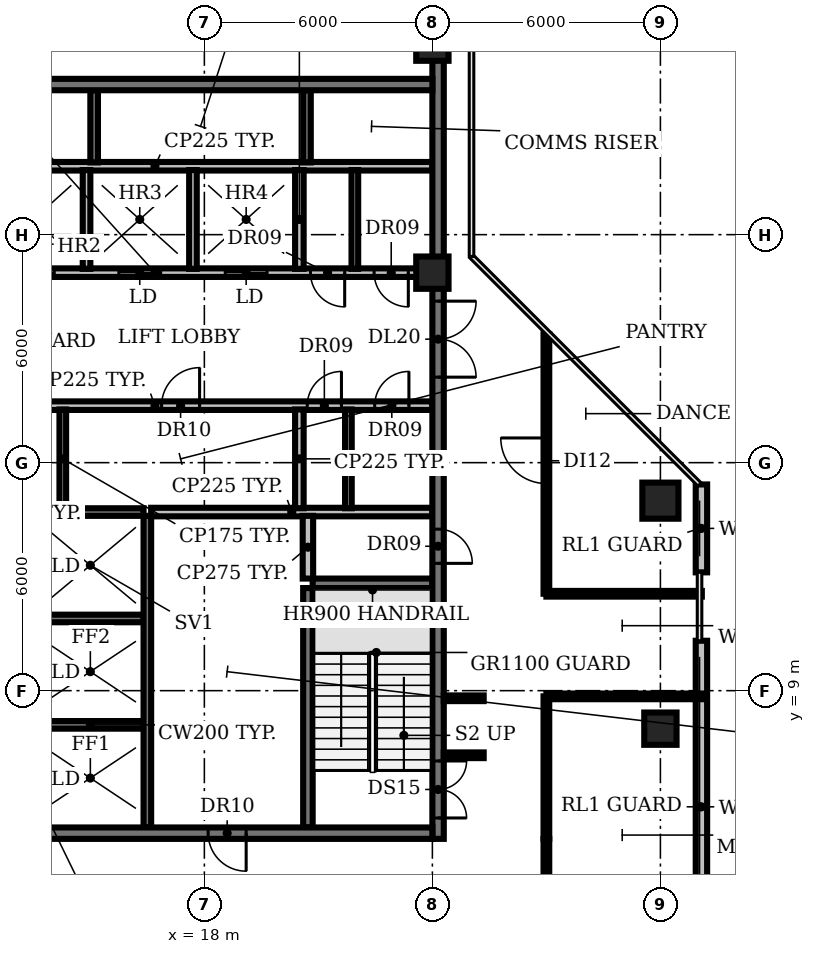
"""IFC4 building model, lengths in metres.
Left out: names, types, materials, properties, quantities, classifications, styles, units other than length and angle.
Written with IfcOpenShell. Run it as: python <this file> out.ifc"""

import sys

from ifc_helpers import new_model, si_unit, direction, frame, frame_2d, origin, origin_2d, place, context, subcontext, project, spatial, rectangle, circle, extrude, element, fill, save


model = new_model("IFC4")
c1 = context("Model", 3, precision=1e-05, world=origin(), true_north=direction((0.0, 1.0)))
c2 = subcontext(c1, "Body", "Model", "MODEL_VIEW")
j1 = project(units=[si_unit("LENGTHUNIT", "METRE"), si_unit("PLANEANGLEUNIT", "RADIAN")], contexts=[c1])
p1 = place(None, origin())
s1 = spatial("IfcSite", under=j1, at=p1, CompositionType="ELEMENT")
p2 = place(p1, origin())
s2 = spatial("IfcBuilding", under=s1, at=p2, CompositionType="ELEMENT")
p3 = place(p2, frame((0.0, 0.0, 264.2)))
s3 = spatial("IfcBuildingStorey", under=s2, at=p3, CompositionType="ELEMENT", Elevation=264.2)
p4 = place(p3, frame((24.0, 20.0, 0.0), z_axis=(0.0, 0.0, 1.0), x_axis=(1.0, 0.0, 0.0)))
e1 = element("IfcColumn", 1, at=p4, inside=s3, PredefinedType="COLUMN", context=c2, shape_type="SweptSolid", body=[
    extrude(circle(Radius=0.425, at=origin_2d()), origin(), (0.0, 0.0, 1.0), 3.85),
])
for number, where, z_axis, x_axis in (
    (2, (24.0, 26.0, -0.35), (0.0, 0.0, 1.0), (1.0, 0.0, 0.0)),
    (3, (30.0, 8.0, -0.35), (0.0, 0.0, 1.0), (1.0, 0.0, 0.0)),
):
    element("IfcColumn", number, at=place(p3, frame(where, z_axis=z_axis, x_axis=x_axis)), inside=s3, PredefinedType="COLUMN", context=c2, shape_type="SweptSolid", body=[
        extrude(rectangle(XDim=0.85, YDim=0.85, at=origin_2d()), origin(), (0.0, 0.0, 1.0), 4.2),
    ])
p5 = place(p3, frame((30.0, 14.0, -0.35), z_axis=(0.0, 0.0, 1.0), x_axis=(1.0, 0.0, 0.0)))
e4 = element("IfcColumn", 4, at=p5, inside=s3, PredefinedType="COLUMN", context=c2, shape_type="SweptSolid", body=[
    extrude(circle(Radius=0.475, at=origin_2d()), origin(), (0.0, 0.0, 1.0), 4.2),
])
p6 = place(p3, frame((31.08, 1.573, 0.0), z_axis=(0.0, 0.0, 1.0), x_axis=(0.0, 1.0, 0.0)))
e5 = element("IfcWall", 5, at=p6, inside=s3, PredefinedType="SOLIDWALL", context=c2, shape_type="SweptSolid", body=[
    extrude(rectangle(XDim=8.74, YDim=0.3, at=frame_2d((4.37, 0.0))), origin(), (0.0, 0.0, 1.0), 3.85),
])
p7 = place(p3, frame((31.08, 12.113, 0.0), z_axis=(0.0, 0.0, 1.0), x_axis=(0.0, 1.0, 0.0)))
e6 = element("IfcWall", 6, at=p7, inside=s3, PredefinedType="SOLIDWALL", context=c2, shape_type="SweptSolid", body=[
    extrude(rectangle(XDim=2.313, YDim=0.3, at=frame_2d((1.157, 0.0))), origin(), (0.0, 0.0, 1.0), 3.85),
])
for number, where, z_axis, x_axis in (
    (7, (13.6, 8.1, 0.0), (0.0, 0.0, 1.0), (1.0, 0.0, 0.0)),
    (8, (13.6, 10.9, 0.0), (0.0, 0.0, 1.0), (1.0, 0.0, 0.0)),
):
    element("IfcWall", number, at=place(p3, frame(where, z_axis=z_axis, x_axis=x_axis)), inside=s3, PredefinedType="SHEAR", context=c2, shape_type="SweptSolid", body=[
        extrude(rectangle(XDim=2.8, YDim=0.2, at=frame_2d((1.4, 0.0))), origin(), (0.0, 0.0, 1.0), 3.85),
    ])
p8 = place(p3, frame((20.85, 11.825, 0.0), z_axis=(0.0, 0.0, 1.0), x_axis=(1.0, 0.0, 0.0)))
e9 = element("IfcWall", 9, at=p8, inside=s3, PredefinedType="SHEAR", context=c2, shape_type="SweptSolid", body=[
    extrude(rectangle(XDim=3.15, YDim=0.25, at=frame_2d((1.575, 0.0))), origin(), (0.0, 0.0, 1.0), 3.85),
])
p9 = place(p3, frame((13.6, 13.7, 0.0), z_axis=(0.0, 0.0, 1.0), x_axis=(1.0, 0.0, 0.0)))
e10 = element("IfcWall", 10, at=p9, inside=s3, PredefinedType="SHEAR", context=c2, shape_type="SweptSolid", body=[
    extrude(rectangle(XDim=2.8, YDim=0.2, at=frame_2d((1.4, 0.0))), origin(), (0.0, 0.0, 1.0), 3.85),
])
p10 = place(p3, frame((16.6, 13.7, 0.0), z_axis=(0.0, 0.0, 1.0), x_axis=(1.0, 0.0, 0.0)))
e11 = element("IfcWall", 11, at=p10, inside=s3, PredefinedType="PARTITIONING", context=c2, shape_type="SweptSolid", body=[
    extrude(rectangle(XDim=7.4, YDim=0.225, at=frame_2d((3.7, 0.0))), origin(), (0.0, 0.0, 1.0), 3.85),
])
p11 = place(p3, frame((9.4, 16.5, 0.0), z_axis=(0.0, 0.0, 1.0), x_axis=(1.0, 0.0, 0.0)))
e12 = element("IfcWall", 12, at=p11, inside=s3, PredefinedType="PARTITIONING", context=c2, shape_type="SweptSolid", body=[
    extrude(rectangle(XDim=14.6, YDim=0.225, at=frame_2d((7.3, 0.0))), origin(), (0.0, 0.0, 1.0), 3.85),
])
p12 = place(p11, frame((1.9, 0.0, 0.0)))
e13 = element("IfcOpeningElement", 13, at=p12, cuts=e12, PredefinedType="OPENING", context=c2, shape_type="SweptSolid", body=[
    extrude(rectangle(XDim=1.0, YDim=2.1, at=frame_2d((0.5, 1.05))), frame((0.0, 0.123, 0.0), z_axis=(0.0, -1.0, 0.0), x_axis=(1.0, 0.0, 0.0)), (0.0, 0.0, 1.0), 0.245),
])
p13 = place(p11, frame((7.475, 0.0, 0.0)))
e14 = element("IfcOpeningElement", 14, at=p13, cuts=e12, PredefinedType="OPENING", context=c2, shape_type="SweptSolid", body=[
    extrude(rectangle(XDim=1.0, YDim=2.1, at=frame_2d((0.5, 1.05))), frame((0.0, 0.123, 0.0), z_axis=(0.0, -1.0, 0.0), x_axis=(1.0, 0.0, 0.0)), (0.0, 0.0, 1.0), 0.245),
])
p14 = place(p11, frame((11.308, 0.0, 0.0)))
e15 = element("IfcOpeningElement", 15, at=p14, cuts=e12, PredefinedType="OPENING", context=c2, shape_type="SweptSolid", body=[
    extrude(rectangle(XDim=0.9, YDim=2.1, at=frame_2d((0.45, 1.05))), frame((0.0, 0.123, 0.0), z_axis=(0.0, -1.0, 0.0), x_axis=(1.0, 0.0, 0.0)), (0.0, 0.0, 1.0), 0.245),
])
p15 = place(p11, frame((13.083, 0.0, 0.0)))
e16 = element("IfcOpeningElement", 16, at=p15, cuts=e12, PredefinedType="OPENING", context=c2, shape_type="SweptSolid", body=[
    extrude(rectangle(XDim=0.9, YDim=2.1, at=frame_2d((0.45, 1.05))), frame((0.0, 0.123, 0.0), z_axis=(0.0, -1.0, 0.0), x_axis=(1.0, 0.0, 0.0)), (0.0, 0.0, 1.0), 0.245),
])
p16 = place(p3, frame((24.0, 20.0, 0.0), z_axis=(0.0, 0.0, 1.0), x_axis=(-1.0, 0.0, 0.0)))
e17 = element("IfcWall", 17, at=p16, inside=s3, PredefinedType="PARTITIONING", context=c2, shape_type="SweptSolid", body=[
    extrude(rectangle(XDim=14.6, YDim=0.225, at=frame_2d((7.3, 0.0))), origin(), (0.0, 0.0, 1.0), 3.85),
])
p17 = place(p16, frame((12.75, 0.0, 0.0)))
e18 = element("IfcOpeningElement", 18, at=p17, cuts=e17, PredefinedType="OPENING", context=c2, shape_type="SweptSolid", body=[
    extrude(rectangle(XDim=1.1, YDim=2.1, at=frame_2d((0.55, 1.05))), frame((0.0, 0.123, 0.0), z_axis=(0.0, -1.0, 0.0), x_axis=(1.0, 0.0, 0.0)), (0.0, 0.0, 1.0), 0.245),
])
p18 = place(p16, frame((9.95, 0.0, 0.0)))
e19 = element("IfcOpeningElement", 19, at=p18, cuts=e17, PredefinedType="OPENING", context=c2, shape_type="SweptSolid", body=[
    extrude(rectangle(XDim=1.1, YDim=2.1, at=frame_2d((0.55, 1.05))), frame((0.0, 0.123, 0.0), z_axis=(0.0, -1.0, 0.0), x_axis=(1.0, 0.0, 0.0)), (0.0, 0.0, 1.0), 0.245),
])
p19 = place(p16, frame((7.15, 0.0, 0.0)))
e20 = element("IfcOpeningElement", 20, at=p19, cuts=e17, PredefinedType="OPENING", context=c2, shape_type="SweptSolid", body=[
    extrude(rectangle(XDim=1.1, YDim=2.1, at=frame_2d((0.55, 1.05))), frame((0.0, 0.123, 0.0), z_axis=(0.0, -1.0, 0.0), x_axis=(1.0, 0.0, 0.0)), (0.0, 0.0, 1.0), 0.245),
])
p20 = place(p16, frame((4.35, 0.0, 0.0)))
e21 = element("IfcOpeningElement", 21, at=p20, cuts=e17, PredefinedType="OPENING", context=c2, shape_type="SweptSolid", body=[
    extrude(rectangle(XDim=1.1, YDim=2.1, at=frame_2d((0.55, 1.05))), frame((0.0, 0.123, 0.0), z_axis=(0.0, -1.0, 0.0), x_axis=(1.0, 0.0, 0.0)), (0.0, 0.0, 1.0), 0.245),
])
p21 = place(p16, frame((2.308, 0.0, 0.0)))
e22 = element("IfcOpeningElement", 22, at=p21, cuts=e17, PredefinedType="OPENING", context=c2, shape_type="SweptSolid", body=[
    extrude(rectangle(XDim=0.9, YDim=2.1, at=frame_2d((0.45, 1.05))), frame((0.0, 0.123, 0.0), z_axis=(0.0, -1.0, 0.0), x_axis=(1.0, 0.0, 0.0)), (0.0, 0.0, 1.0), 0.245),
])
p22 = place(p16, frame((0.633, 0.0, 0.0)))
e23 = element("IfcOpeningElement", 23, at=p22, cuts=e17, PredefinedType="OPENING", context=c2, shape_type="SweptSolid", body=[
    extrude(rectangle(XDim=0.9, YDim=2.1, at=frame_2d((0.45, 1.05))), frame((0.0, 0.123, 0.0), z_axis=(0.0, -1.0, 0.0), x_axis=(1.0, 0.0, 0.0)), (0.0, 0.0, 1.0), 0.245),
])
p23 = place(p3, frame((9.4, 22.8, 0.0), z_axis=(0.0, 0.0, 1.0), x_axis=(1.0, 0.0, 0.0)))
e24 = element("IfcWall", 24, at=p23, inside=s3, PredefinedType="PARTITIONING", context=c2, shape_type="SweptSolid", body=[
    extrude(rectangle(XDim=14.6, YDim=0.225, at=frame_2d((7.3, 0.0))), origin(), (0.0, 0.0, 1.0), 3.85),
])
p24 = place(p3, frame((14.275, 13.8, 0.0), z_axis=(0.0, 0.0, 1.0), x_axis=(0.0, 1.0, 0.0)))
e25 = element("IfcWall", 25, at=p24, inside=s3, PredefinedType="PARTITIONING", context=c2, shape_type="SweptSolid", body=[
    extrude(rectangle(XDim=2.6, YDim=0.175, at=frame_2d((1.3, 0.0))), origin(), (0.0, 0.0, 1.0), 3.85),
])
p25 = place(p3, frame((14.9, 20.1, 0.0), z_axis=(0.0, 0.0, 1.0), x_axis=(0.0, 1.0, 0.0)))
e26 = element("IfcWall", 26, at=p25, inside=s3, PredefinedType="SOLIDWALL", context=c2, shape_type="SweptSolid", body=[
    extrude(rectangle(XDim=2.6, YDim=0.2, at=frame_2d((1.3, 0.0))), origin(), (0.0, 0.0, 1.0), 3.85),
])
p26 = place(p3, frame((15.1, 22.9, 0.0), z_axis=(0.0, 0.0, 1.0), x_axis=(0.0, 1.0, 0.0)))
e27 = element("IfcWall", 27, at=p26, inside=s3, PredefinedType="SHEAR", context=c2, shape_type="SweptSolid", body=[
    extrude(rectangle(XDim=1.9, YDim=0.2, at=frame_2d((0.95, 0.0))), origin(), (0.0, 0.0, 1.0), 3.85),
])
p27 = place(p3, frame((16.5, 5.4, 0.0), z_axis=(0.0, 0.0, 1.0), x_axis=(0.0, 1.0, 0.0)))
e28 = element("IfcWall", 28, at=p27, inside=s3, PredefinedType="SHEAR", context=c2, shape_type="SweptSolid", body=[
    extrude(rectangle(XDim=8.2, YDim=0.2, at=frame_2d((4.1, 0.0))), origin(), (0.0, 0.0, 1.0), 3.85),
])
p28 = place(p3, frame((17.7, 20.1, 0.0), z_axis=(0.0, 0.0, 1.0), x_axis=(0.0, 1.0, 0.0)))
e29 = element("IfcWall", 29, at=p28, inside=s3, PredefinedType="SOLIDWALL", context=c2, shape_type="SweptSolid", body=[
    extrude(rectangle(XDim=2.6, YDim=0.2, at=frame_2d((1.3, 0.0))), origin(), (0.0, 0.0, 1.0), 3.85),
])
for number, where, z_axis, x_axis in (
    (30, (20.5, 13.8, 0.0), (0.0, 0.0, 1.0), (0.0, 1.0, 0.0)),
    (31, (20.5, 20.1, 0.0), (0.0, 0.0, 1.0), (0.0, 1.0, 0.0)),
):
    element("IfcWall", number, at=place(p3, frame(where, z_axis=z_axis, x_axis=x_axis)), inside=s3, PredefinedType="PARTITIONING", context=c2, shape_type="SweptSolid", body=[
        extrude(rectangle(XDim=2.6, YDim=0.225, at=frame_2d((1.3, 0.0))), origin(), (0.0, 0.0, 1.0), 3.85),
    ])
p29 = place(p3, frame((20.7, 22.9, 0.0), z_axis=(0.0, 0.0, 1.0), x_axis=(0.0, 1.0, 0.0)))
e32 = element("IfcWall", 32, at=p29, inside=s3, PredefinedType="SHEAR", context=c2, shape_type="SweptSolid", body=[
    extrude(rectangle(XDim=1.9, YDim=0.2, at=frame_2d((0.95, 0.0))), origin(), (0.0, 0.0, 1.0), 3.85),
])
p30 = place(p3, frame((20.725, 5.4, 0.0), z_axis=(0.0, 0.0, 1.0), x_axis=(0.0, 1.0, 0.0)))
e33 = element("IfcWall", 33, at=p30, inside=s3, PredefinedType="SHEAR", context=c2, shape_type="SweptSolid", body=[
    extrude(rectangle(XDim=6.3, YDim=0.25, at=frame_2d((3.15, 0.0))), origin(), (0.0, 0.0, 1.0), 3.85),
])
p31 = place(p3, frame((20.725, 11.95, 0.0), z_axis=(0.0, 0.0, 1.0), x_axis=(0.0, 1.0, 0.0)))
e34 = element("IfcWall", 34, at=p31, inside=s3, PredefinedType="PARTITIONING", context=c2, shape_type="SweptSolid", body=[
    extrude(rectangle(XDim=1.65, YDim=0.275, at=frame_2d((0.825, 0.0))), origin(), (0.0, 0.0, 1.0), 3.85),
])
for number, where, z_axis, x_axis in (
    (35, (21.79, 13.8, 0.0), (0.0, 0.0, 1.0), (0.0, 1.0, 0.0)),
    (36, (21.96, 20.1, 0.0), (0.0, 0.0, 1.0), (0.0, 1.0, 0.0)),
):
    element("IfcWall", number, at=place(p3, frame(where, z_axis=z_axis, x_axis=x_axis)), inside=s3, PredefinedType="PARTITIONING", context=c2, shape_type="SweptSolid", body=[
        extrude(rectangle(XDim=2.6, YDim=0.175, at=frame_2d((1.3, 0.0))), origin(), (0.0, 0.0, 1.0), 3.85),
    ])
p32 = place(p3, frame((24.15, 25.605, 0.0), z_axis=(0.0, 0.0, 1.0), x_axis=(0.0, -1.0, 0.0)))
e37 = element("IfcWall", 37, at=p32, inside=s3, PredefinedType="SHEAR", context=c2, shape_type="SweptSolid", body=[
    extrude(rectangle(XDim=20.505, YDim=0.3, at=frame_2d((10.252, 0.0))), origin(), (0.0, 0.0, 1.0), 3.85),
])
p33 = place(p32, frame((18.455, 0.0, 0.0)))
e38 = element("IfcOpeningElement", 38, at=p33, cuts=e37, PredefinedType="OPENING", context=c2, shape_type="SweptSolid", body=[
    extrude(rectangle(XDim=1.5, YDim=2.1, at=frame_2d((0.75, 1.05))), frame((0.0, 0.16, 0.0), z_axis=(0.0, -1.0, 0.0), x_axis=(1.0, 0.0, 0.0)), (0.0, 0.0, 1.0), 0.32),
])
p34 = place(p32, frame((12.355, 0.0, 0.0)))
e39 = element("IfcOpeningElement", 39, at=p34, cuts=e37, PredefinedType="OPENING", context=c2, shape_type="SweptSolid", body=[
    extrude(rectangle(XDim=0.9, YDim=2.1, at=frame_2d((0.45, 1.05))), frame((0.0, 0.16, 0.0), z_axis=(0.0, -1.0, 0.0), x_axis=(1.0, 0.0, 0.0)), (0.0, 0.0, 1.0), 0.32),
])
p35 = place(p32, frame((6.355, 0.0, 0.0)))
e40 = element("IfcOpeningElement", 40, at=p35, cuts=e37, PredefinedType="OPENING", context=c2, shape_type="SweptSolid", body=[
    extrude(rectangle(XDim=2.0, YDim=2.1, at=frame_2d((1.0, 1.05))), frame((0.0, 0.16, 0.0), z_axis=(0.0, -1.0, 0.0), x_axis=(1.0, 0.0, 0.0)), (0.0, 0.0, 1.0), 0.32),
])
p36 = place(p3, frame((24.0, 5.25, 0.0), z_axis=(0.0, 0.0, 1.0), x_axis=(-1.0, 0.0, 0.0)))
e41 = element("IfcWall", 41, at=p36, inside=s3, PredefinedType="SHEAR", context=c2, shape_type="SweptSolid", body=[
    extrude(rectangle(XDim=18.0, YDim=0.3, at=frame_2d((9.0, 0.0))), origin(), (0.0, 0.0, 1.0), 3.85),
])
p37 = place(p36, frame((13.0, 0.0, 0.0)))
e42 = element("IfcOpeningElement", 42, at=p37, cuts=e41, PredefinedType="OPENING", context=c2, shape_type="SweptSolid", body=[
    extrude(rectangle(XDim=1.2, YDim=2.1, at=frame_2d((0.6, 1.05))), frame((0.0, 0.16, 0.0), z_axis=(0.0, -1.0, 0.0), x_axis=(1.0, 0.0, 0.0)), (0.0, 0.0, 1.0), 0.32),
])
p38 = place(p36, frame((4.9, 0.0, 0.0)))
e43 = element("IfcOpeningElement", 43, at=p38, cuts=e41, PredefinedType="OPENING", context=c2, shape_type="SweptSolid", body=[
    extrude(rectangle(XDim=1.0, YDim=2.1, at=frame_2d((0.5, 1.05))), frame((0.0, 0.16, 0.0), z_axis=(0.0, -1.0, 0.0), x_axis=(1.0, 0.0, 0.0)), (0.0, 0.0, 1.0), 0.32),
])
p39 = place(p3, frame((6.0, 24.95, 0.0), z_axis=(0.0, 0.0, 1.0), x_axis=(1.0, 0.0, 0.0)))
e44 = element("IfcWall", 44, at=p39, inside=s3, PredefinedType="SHEAR", context=c2, shape_type="SweptSolid", body=[
    extrude(rectangle(XDim=18.0, YDim=0.3, at=frame_2d((9.0, 0.0))), origin(), (0.0, 0.0, 1.0), 3.85),
])
for number, where, z_axis, x_axis in (
    (45, (24.3, 7.3, 0.0), (0.0, 0.0, 1.0), (1.0, 0.0, 0.0)),
    (46, (24.3, 8.8, 0.0), (0.0, 0.0, 1.0), (1.0, 0.0, 0.0)),
):
    element("IfcWall", number, at=place(p3, frame(where, z_axis=z_axis, x_axis=x_axis)), inside=s3, PredefinedType="PARTITIONING", context=c2, shape_type="SweptSolid", body=[
        extrude(rectangle(XDim=1.05, YDim=0.15, at=frame_2d((0.525, 0.0))), origin(), (0.0, 0.0, 1.0), 2.9),
    ])
p40 = place(p3, frame((27.0, 1.2, 0.0), z_axis=(0.0, 0.0, 1.0), x_axis=(0.0, 1.0, 0.0)))
e47 = element("IfcWall", 47, at=p40, inside=s3, PredefinedType="PARTITIONING", context=c2, shape_type="SweptSolid", body=[
    extrude(rectangle(XDim=3.9, YDim=0.15, at=frame_2d((1.95, 0.0))), origin(), (0.0, 0.0, 1.0), 2.9),
])
p41 = place(p40, frame((1.4, 0.0, 0.0)))
e48 = element("IfcOpeningElement", 48, at=p41, cuts=e47, PredefinedType="OPENING", context=c2, shape_type="SweptSolid", body=[
    extrude(rectangle(XDim=1.2, YDim=2.1, at=frame_2d((0.6, 1.05))), frame((0.0, 0.085, 0.0), z_axis=(0.0, -1.0, 0.0), x_axis=(1.0, 0.0, 0.0)), (0.0, 0.0, 1.0), 0.17),
])
p42 = place(p3, frame((27.0, 5.1, 0.0), z_axis=(0.0, 0.0, 1.0), x_axis=(0.0, 1.0, 0.0)))
e49 = element("IfcWall", 49, at=p42, inside=s3, PredefinedType="PARTITIONING", context=c2, shape_type="SweptSolid", body=[
    extrude(rectangle(XDim=3.75, YDim=0.15, at=frame_2d((1.875, 0.0))), origin(), (0.0, 0.0, 1.0), 2.9),
])
p43 = place(p3, frame((27.0, 8.85, 0.0), z_axis=(0.0, 0.0, 1.0), x_axis=(1.0, 0.0, 0.0)))
e50 = element("IfcWall", 50, at=p43, inside=s3, PredefinedType="PARTITIONING", context=c2, shape_type="SweptSolid", body=[
    extrude(rectangle(XDim=4.09, YDim=0.15, at=frame_2d((2.045, 0.0))), origin(), (0.0, 0.0, 1.0), 2.9),
])
p44 = place(p3, frame((27.0, 11.55, 0.0), z_axis=(0.0, 0.0, 1.0), x_axis=(0.0, 1.0, 0.0)))
e51 = element("IfcWall", 51, at=p44, inside=s3, PredefinedType="PARTITIONING", context=c2, shape_type="SweptSolid", body=[
    extrude(rectangle(XDim=6.83, YDim=0.15, at=frame_2d((3.415, 0.0))), origin(), (0.0, 0.0, 1.0), 2.9),
])
p45 = place(p44, frame((2.9, 0.0, 0.0)))
e52 = element("IfcOpeningElement", 52, at=p45, cuts=e51, PredefinedType="OPENING", context=c2, shape_type="SweptSolid", body=[
    extrude(rectangle(XDim=1.2, YDim=2.1, at=frame_2d((0.6, 1.05))), frame((0.0, 0.085, 0.0), z_axis=(0.0, -1.0, 0.0), x_axis=(1.0, 0.0, 0.0)), (0.0, 0.0, 1.0), 0.17),
])
p46 = place(p3, frame((27.0, 11.55, 0.0), z_axis=(0.0, 0.0, 1.0), x_axis=(1.0, 0.0, 0.0)))
e53 = element("IfcWall", 53, at=p46, inside=s3, PredefinedType="PARTITIONING", context=c2, shape_type="SweptSolid", body=[
    extrude(rectangle(XDim=4.09, YDim=0.15, at=frame_2d((2.045, 0.0))), origin(), (0.0, 0.0, 1.0), 2.9),
])
p47 = place(p13, origin())
e54 = element("IfcDoor", 54, at=p47, inside=s3, OperationType="SINGLE_SWING_RIGHT", PredefinedType="DOOR", context=c2, shape_type="SweptSolid", body=[
    extrude(rectangle(XDim=1.0, YDim=2.1, at=frame_2d((0.5, 1.05))), frame((0.0, 0.025, 0.0), z_axis=(0.0, -1.0, 0.0), x_axis=(1.0, 0.0, 0.0)), (0.0, 0.0, 1.0), 0.05),
])
fill(e14, e54)
p48 = place(p14, origin())
e55 = element("IfcDoor", 55, at=p48, inside=s3, OperationType="SINGLE_SWING_RIGHT", PredefinedType="DOOR", context=c2, shape_type="SweptSolid", body=[
    extrude(rectangle(XDim=0.9, YDim=2.1, at=frame_2d((0.45, 1.05))), frame((0.0, 0.025, 0.0), z_axis=(0.0, -1.0, 0.0), x_axis=(1.0, 0.0, 0.0)), (0.0, 0.0, 1.0), 0.05),
])
fill(e15, e55)
p49 = place(p15, origin())
e56 = element("IfcDoor", 56, at=p49, inside=s3, OperationType="SINGLE_SWING_RIGHT", PredefinedType="DOOR", context=c2, shape_type="SweptSolid", body=[
    extrude(rectangle(XDim=0.9, YDim=2.1, at=frame_2d((0.45, 1.05))), frame((0.0, 0.025, 0.0), z_axis=(0.0, -1.0, 0.0), x_axis=(1.0, 0.0, 0.0)), (0.0, 0.0, 1.0), 0.05),
])
fill(e16, e56)
p50 = place(p18, origin())
e57 = element("IfcDoor", 57, at=p50, inside=s3, OperationType="DOUBLE_DOOR_SLIDING", PredefinedType="DOOR", context=c2, shape_type="SweptSolid", body=[
    extrude(rectangle(XDim=1.1, YDim=2.1, at=frame_2d((0.55, 1.05))), frame((0.0, 0.025, 0.0), z_axis=(0.0, -1.0, 0.0), x_axis=(1.0, 0.0, 0.0)), (0.0, 0.0, 1.0), 0.05),
])
fill(e19, e57)
p51 = place(p19, origin())
e58 = element("IfcDoor", 58, at=p51, inside=s3, OperationType="DOUBLE_DOOR_SLIDING", PredefinedType="DOOR", context=c2, shape_type="SweptSolid", body=[
    extrude(rectangle(XDim=1.1, YDim=2.1, at=frame_2d((0.55, 1.05))), frame((0.0, 0.025, 0.0), z_axis=(0.0, -1.0, 0.0), x_axis=(1.0, 0.0, 0.0)), (0.0, 0.0, 1.0), 0.05),
])
fill(e20, e58)
p52 = place(p20, origin())
e59 = element("IfcDoor", 59, at=p52, inside=s3, OperationType="DOUBLE_DOOR_SLIDING", PredefinedType="DOOR", context=c2, shape_type="SweptSolid", body=[
    extrude(rectangle(XDim=1.1, YDim=2.1, at=frame_2d((0.55, 1.05))), frame((0.0, 0.025, 0.0), z_axis=(0.0, -1.0, 0.0), x_axis=(1.0, 0.0, 0.0)), (0.0, 0.0, 1.0), 0.05),
])
fill(e21, e59)
p53 = place(p21, origin())
e60 = element("IfcDoor", 60, at=p53, inside=s3, OperationType="SINGLE_SWING_LEFT", PredefinedType="DOOR", context=c2, shape_type="SweptSolid", body=[
    extrude(rectangle(XDim=0.9, YDim=2.1, at=frame_2d((0.45, 1.05))), frame((0.0, 0.025, 0.0), z_axis=(0.0, -1.0, 0.0), x_axis=(1.0, 0.0, 0.0)), (0.0, 0.0, 1.0), 0.05),
])
fill(e22, e60)
p54 = place(p22, origin())
e61 = element("IfcDoor", 61, at=p54, inside=s3, OperationType="SINGLE_SWING_LEFT", PredefinedType="DOOR", context=c2, shape_type="SweptSolid", body=[
    extrude(rectangle(XDim=0.9, YDim=2.1, at=frame_2d((0.45, 1.05))), frame((0.0, 0.025, 0.0), z_axis=(0.0, -1.0, 0.0), x_axis=(1.0, 0.0, 0.0)), (0.0, 0.0, 1.0), 0.05),
])
fill(e23, e61)
p55 = place(p33, origin())
e62 = element("IfcDoor", 62, at=p55, inside=s3, OperationType="DOUBLE_DOOR_SINGLE_SWING", PredefinedType="DOOR", context=c2, shape_type="SweptSolid", body=[
    extrude(rectangle(XDim=1.5, YDim=2.1, at=frame_2d((0.75, 1.05))), frame((0.0, 0.025, 0.0), z_axis=(0.0, -1.0, 0.0), x_axis=(1.0, 0.0, 0.0)), (0.0, 0.0, 1.0), 0.05),
])
fill(e38, e62)
p56 = place(p34, origin())
e63 = element("IfcDoor", 63, at=p56, inside=s3, OperationType="SINGLE_SWING_RIGHT", PredefinedType="DOOR", context=c2, shape_type="SweptSolid", body=[
    extrude(rectangle(XDim=0.9, YDim=2.1, at=frame_2d((0.45, 1.05))), frame((0.0, 0.025, 0.0), z_axis=(0.0, -1.0, 0.0), x_axis=(1.0, 0.0, 0.0)), (0.0, 0.0, 1.0), 0.05),
])
fill(e39, e63)
p57 = place(p35, origin())
e64 = element("IfcDoor", 64, at=p57, inside=s3, OperationType="DOUBLE_DOOR_SINGLE_SWING", PredefinedType="DOOR", context=c2, shape_type="SweptSolid", body=[
    extrude(rectangle(XDim=2.0, YDim=2.1, at=frame_2d((1.0, 1.05))), frame((0.0, 0.025, 0.0), z_axis=(0.0, -1.0, 0.0), x_axis=(1.0, 0.0, 0.0)), (0.0, 0.0, 1.0), 0.05),
])
fill(e40, e64)
p58 = place(p38, origin())
e65 = element("IfcDoor", 65, at=p58, inside=s3, OperationType="SINGLE_SWING_LEFT", PredefinedType="DOOR", context=c2, shape_type="SweptSolid", body=[
    extrude(rectangle(XDim=1.0, YDim=2.1, at=frame_2d((0.5, 1.05))), frame((0.0, 0.025, 0.0), z_axis=(0.0, -1.0, 0.0), x_axis=(1.0, 0.0, 0.0)), (0.0, 0.0, 1.0), 0.05),
])
fill(e43, e65)
p59 = place(p45, origin())
e66 = element("IfcDoor", 66, at=p59, inside=s3, OperationType="SINGLE_SWING_RIGHT", PredefinedType="DOOR", context=c2, shape_type="SweptSolid", body=[
    extrude(rectangle(XDim=1.2, YDim=2.1, at=frame_2d((0.6, 1.05))), frame((0.0, 0.025, 0.0), z_axis=(0.0, -1.0, 0.0), x_axis=(1.0, 0.0, 0.0)), (0.0, 0.0, 1.0), 0.05),
])
fill(e52, e66)
save(model, sys.argv[1])
